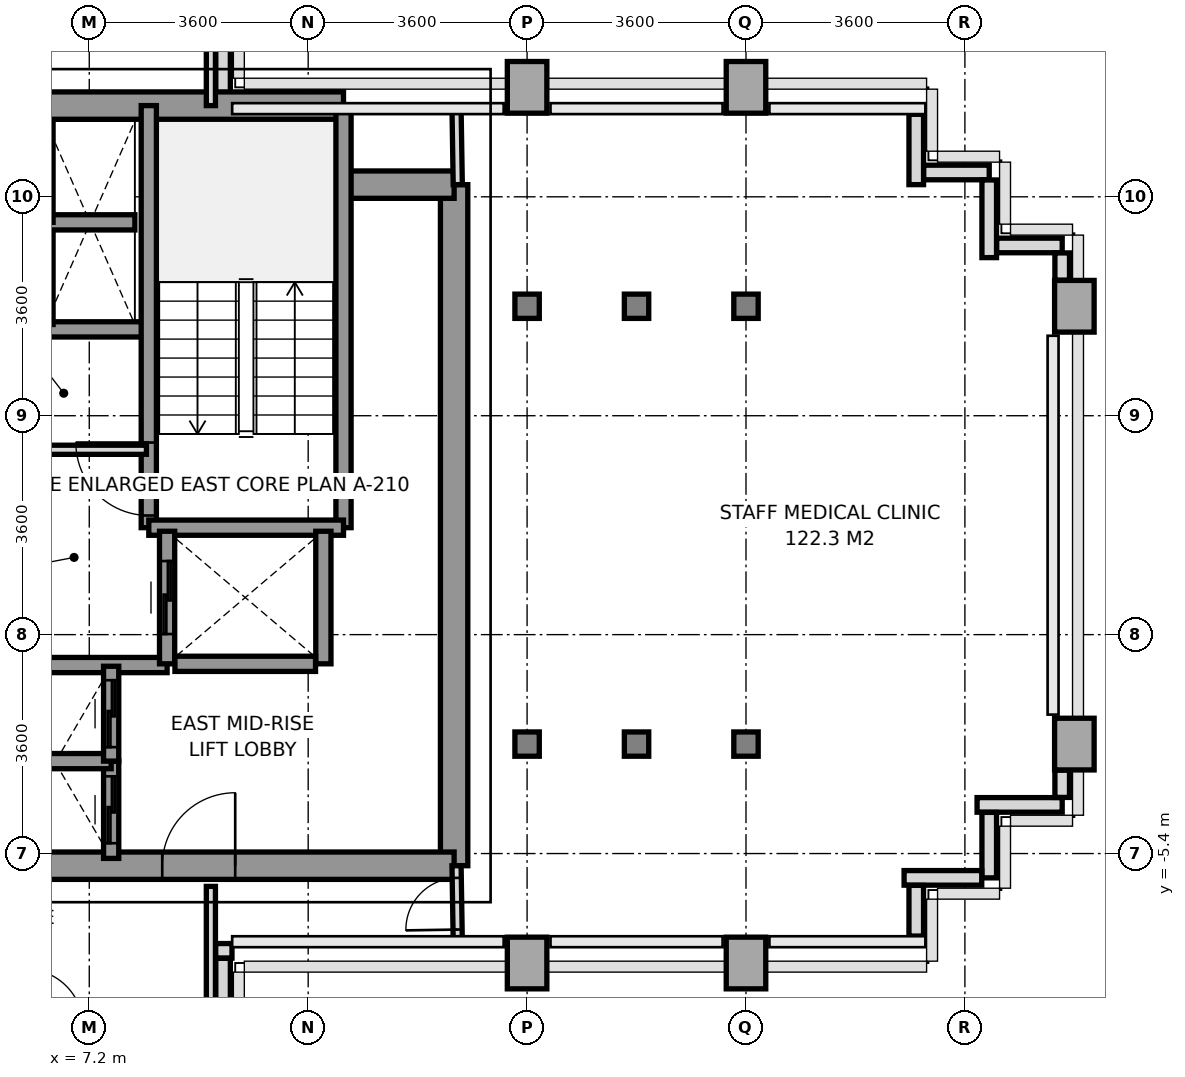
"""IFC4 building model, lengths in metres.
Left out: names, types, materials, properties, quantities, classifications, styles, units other than length and angle.
Written with IfcOpenShell. Run it as: python <this file> out.ifc"""

import sys

from ifc_helpers import new_model, si_unit, direction, frame, frame_2d, origin, origin_2d, place, context, subcontext, project, spatial, rectangle, i_section, extrude, source, transform, mapped, element, fill, save


model = new_model("IFC4")
c1 = context("Model", 3, precision=1e-05, world=origin(), true_north=direction((0.0, 1.0)))
c2 = subcontext(c1, "Body", "Model", "MODEL_VIEW")
j1 = project(units=[si_unit("LENGTHUNIT", "METRE"), si_unit("PLANEANGLEUNIT", "RADIAN")], contexts=[c1])
p1 = place(None, origin())
s1 = spatial("IfcSite", under=j1, at=p1, CompositionType="ELEMENT")
p2 = place(p1, origin())
s2 = spatial("IfcBuilding", under=s1, at=p2, CompositionType="ELEMENT")
p3 = place(p2, frame((0.0, 0.0, 144.8)))
s3 = spatial("IfcBuildingStorey", under=s2, at=p3, CompositionType="ELEMENT", Elevation=144.8)
m1 = source(origin(), c2, "Body", "SweptSolid", [
    extrude(rectangle(XDim=0.65, YDim=0.85, at=origin_2d()), origin(), (0.0, 0.0, 1.0), 3.2),
])
p4 = place(p3, frame((14.4, -7.2, 0.0), z_axis=(0.0, 0.0, 1.0), x_axis=(1.0, 0.0, 0.0)))
e1 = element("IfcColumn", 1, at=p4, inside=s3, PredefinedType="COLUMN", context=c2, shape_type="MappedRepresentation", body=[
    mapped(m1, transform((0.0, 0.0, 0.0), x_axis=(1.0, 0.0, 0.0), y_axis=(0.0, 1.0, 0.0), z_axis=(0.0, 0.0, 1.0), scale=1.0)),
])
m2 = source(origin(), c2, "Body", "SweptSolid", [
    extrude(i_section(OverallWidth=0.401, OverallDepth=0.399, WebThickness=0.02, FlangeThickness=0.032, at=origin_2d()), origin(), (0.0, 0.0, 1.0), 3.2),
])
for number, where, z_axis, x_axis in (
    (2, (14.4, -3.6, 0.0), (0.0, 0.0, 1.0), (1.0, 0.0, 0.0)),
    (3, (14.4, 3.6, 0.0), (0.0, 0.0, 1.0), (1.0, 0.0, 0.0)),
):
    element("IfcColumn", number, at=place(p3, frame(where, z_axis=z_axis, x_axis=x_axis)), inside=s3, PredefinedType="COLUMN", context=c2, shape_type="MappedRepresentation", body=[
        mapped(m2, transform((0.0, 0.0, 0.0), x_axis=(1.0, 0.0, 0.0), y_axis=(0.0, 1.0, 0.0), z_axis=(0.0, 0.0, 1.0), scale=1.0)),
    ])
p5 = place(p3, frame((14.4, 7.2, 0.0), z_axis=(0.0, 0.0, 1.0), x_axis=(1.0, 0.0, 0.0)))
e4 = element("IfcColumn", 4, at=p5, inside=s3, PredefinedType="COLUMN", context=c2, shape_type="MappedRepresentation", body=[
    mapped(m1, transform((0.0, 0.0, 0.0), x_axis=(1.0, 0.0, 0.0), y_axis=(0.0, 1.0, 0.0), z_axis=(0.0, 0.0, 1.0), scale=1.0)),
])
for number, where, z_axis, x_axis in (
    (5, (16.2, -3.6, 0.0), (0.0, 0.0, 1.0), (1.0, 0.0, 0.0)),
    (6, (16.2, 3.6, 0.0), (0.0, 0.0, 1.0), (1.0, 0.0, 0.0)),
):
    element("IfcColumn", number, at=place(p3, frame(where, z_axis=z_axis, x_axis=x_axis)), inside=s3, PredefinedType="COLUMN", context=c2, shape_type="MappedRepresentation", body=[
        mapped(m2, transform((0.0, 0.0, 0.0), x_axis=(1.0, 0.0, 0.0), y_axis=(0.0, 1.0, 0.0), z_axis=(0.0, 0.0, 1.0), scale=1.0)),
    ])
p6 = place(p3, frame((18.0, -7.2, 0.0), z_axis=(0.0, 0.0, 1.0), x_axis=(1.0, 0.0, 0.0)))
e7 = element("IfcColumn", 7, at=p6, inside=s3, PredefinedType="COLUMN", context=c2, shape_type="MappedRepresentation", body=[
    mapped(m1, transform((0.0, 0.0, 0.0), x_axis=(1.0, 0.0, 0.0), y_axis=(0.0, 1.0, 0.0), z_axis=(0.0, 0.0, 1.0), scale=1.0)),
])
for number, where, z_axis, x_axis in (
    (8, (18.0, -3.6, 0.0), (0.0, 0.0, 1.0), (1.0, 0.0, 0.0)),
    (9, (18.0, 3.6, 0.0), (0.0, 0.0, 1.0), (1.0, 0.0, 0.0)),
):
    element("IfcColumn", number, at=place(p3, frame(where, z_axis=z_axis, x_axis=x_axis)), inside=s3, PredefinedType="COLUMN", context=c2, shape_type="MappedRepresentation", body=[
        mapped(m2, transform((0.0, 0.0, 0.0), x_axis=(1.0, 0.0, 0.0), y_axis=(0.0, 1.0, 0.0), z_axis=(0.0, 0.0, 1.0), scale=1.0)),
    ])
for number, where, z_axis, x_axis in (
    (10, (18.0, 7.2, 0.0), (0.0, 0.0, 1.0), (1.0, 0.0, 0.0)),
    (11, (23.4, -3.6, 0.0), (0.0, 0.0, 1.0), (1.0, 0.0, 0.0)),
    (12, (23.4, 3.6, 0.0), (0.0, 0.0, 1.0), (1.0, 0.0, 0.0)),
):
    element("IfcColumn", number, at=place(p3, frame(where, z_axis=z_axis, x_axis=x_axis)), inside=s3, PredefinedType="COLUMN", context=c2, shape_type="MappedRepresentation", body=[
        mapped(m1, transform((0.0, 0.0, 0.0), x_axis=(1.0, 0.0, 0.0), y_axis=(0.0, 1.0, 0.0), z_axis=(0.0, 0.0, 1.0), scale=1.0)),
    ])
p7 = place(p3, frame((23.2, -4.6, 0.0), z_axis=(0.0, 0.0, 1.0), x_axis=(-1.0, 0.0, 0.0)))
e13 = element("IfcWall", 13, at=p7, inside=s3, PredefinedType="PARAPET", context=c2, shape_type="SweptSolid", body=[
    extrude(rectangle(XDim=1.4, YDim=0.24, at=frame_2d((0.7, 0.0))), origin(), (0.0, 0.0, 1.0), 1.15),
])
p8 = place(p3, frame((22.0, -4.723, 0.0), z_axis=(0.0, 0.0, 1.0), x_axis=(0.0, -1.0, 0.0)))
e14 = element("IfcWall", 14, at=p8, inside=s3, PredefinedType="PARAPET", context=c2, shape_type="SweptSolid", body=[
    extrude(rectangle(XDim=1.077, YDim=0.24, at=frame_2d((0.539, 0.0))), origin(), (0.0, 0.0, 1.0), 1.15),
])
p9 = place(p3, frame((21.877, -5.8, 0.0), z_axis=(0.0, 0.0, 1.0), x_axis=(-1.0, 0.0, 0.0)))
e15 = element("IfcWall", 15, at=p9, inside=s3, PredefinedType="PARAPET", context=c2, shape_type="SweptSolid", body=[
    extrude(rectangle(XDim=1.277, YDim=0.24, at=frame_2d((0.638, 0.0))), origin(), (0.0, 0.0, 1.0), 1.15),
])
p10 = place(p3, frame((20.8, -5.923, 0.0), z_axis=(0.0, 0.0, 1.0), x_axis=(0.0, -1.0, 0.0)))
e16 = element("IfcWall", 16, at=p10, inside=s3, PredefinedType="PARAPET", context=c2, shape_type="SweptSolid", body=[
    extrude(rectangle(XDim=0.834, YDim=0.24, at=frame_2d((0.417, 0.0))), origin(), (0.0, 0.0, 1.0), 1.15),
])
p11 = place(p3, frame((9.547, -7.0, 0.0), z_axis=(0.0, 0.0, 1.0), x_axis=(-1.0, 0.0, 0.0)))
e17 = element("IfcWall", 17, at=p11, inside=s3, PredefinedType="PARAPET", context=c2, shape_type="SweptSolid", body=[
    extrude(rectangle(XDim=0.269, YDim=0.24, at=frame_2d((0.135, 0.0))), origin(), (0.0, 0.0, 1.0), 1.15),
])
p12 = place(p3, frame((9.4, -7.123, 0.0), z_axis=(0.0, 0.0, 1.0), x_axis=(0.0, -1.0, 0.0)))
e18 = element("IfcWall", 18, at=p12, inside=s3, PredefinedType="PARAPET", context=c2, shape_type="SweptSolid", body=[
    extrude(rectangle(XDim=1.349, YDim=0.24, at=frame_2d((0.674, 0.0))), origin(), (0.0, 0.0, 1.0), 1.15),
])
p13 = place(p3, frame((9.4, 8.472, 0.0), z_axis=(0.0, 0.0, 1.0), x_axis=(0.0, -1.0, 0.0)))
e19 = element("IfcWall", 19, at=p13, inside=s3, PredefinedType="PARAPET", context=c2, shape_type="SweptSolid", body=[
    extrude(rectangle(XDim=1.519, YDim=0.24, at=frame_2d((0.76, 0.0))), origin(), (0.0, 0.0, 1.0), 1.15),
])
p14 = place(p3, frame((20.8, 6.757, 0.0), z_axis=(0.0, 0.0, 1.0), x_axis=(0.0, -1.0, 0.0)))
e20 = element("IfcWall", 20, at=p14, inside=s3, PredefinedType="PARAPET", context=c2, shape_type="SweptSolid", body=[
    extrude(rectangle(XDim=1.157, YDim=0.24, at=frame_2d((0.579, 0.0))), origin(), (0.0, 0.0, 1.0), 1.15),
])
p15 = place(p3, frame((20.923, 5.8, 0.0), z_axis=(0.0, 0.0, 1.0), x_axis=(1.0, 0.0, 0.0)))
e21 = element("IfcWall", 21, at=p15, inside=s3, PredefinedType="PARAPET", context=c2, shape_type="SweptSolid", body=[
    extrude(rectangle(XDim=1.077, YDim=0.24, at=frame_2d((0.539, 0.0))), origin(), (0.0, 0.0, 1.0), 1.15),
])
p16 = place(p3, frame((22.0, 5.677, 0.0), z_axis=(0.0, 0.0, 1.0), x_axis=(0.0, -1.0, 0.0)))
e22 = element("IfcWall", 22, at=p16, inside=s3, PredefinedType="PARAPET", context=c2, shape_type="SweptSolid", body=[
    extrude(rectangle(XDim=1.277, YDim=0.24, at=frame_2d((0.639, 0.0))), origin(), (0.0, 0.0, 1.0), 1.15),
])
p17 = place(p3, frame((22.123, 4.6, 0.0), z_axis=(0.0, 0.0, 1.0), x_axis=(1.0, 0.0, 0.0)))
e23 = element("IfcWall", 23, at=p17, inside=s3, PredefinedType="PARAPET", context=c2, shape_type="SweptSolid", body=[
    extrude(rectangle(XDim=1.077, YDim=0.24, at=frame_2d((0.539, 0.0))), origin(), (0.0, 0.0, 1.0), 1.15),
])
for number, where, z_axis, x_axis in (
    (24, (23.2, 4.477, 0.0), (0.0, 0.0, 1.0), (0.0, -1.0, 0.0)),
    (25, (23.2, -4.028, 0.0), (0.0, 0.0, 1.0), (0.0, -1.0, 0.0)),
):
    element("IfcWall", number, at=place(p3, frame(where, z_axis=z_axis, x_axis=x_axis)), inside=s3, PredefinedType="PARAPET", context=c2, shape_type="SweptSolid", body=[
        extrude(rectangle(XDim=0.449, YDim=0.24, at=frame_2d((0.225, 0.0))), origin(), (0.0, 0.0, 1.0), 1.15),
    ])
p18 = place(p3, frame((13.2, -5.6, 0.0), z_axis=(0.0, 0.0, 1.0), x_axis=(0.0, 1.0, 0.0)))
e26 = element("IfcWall", 26, at=p18, inside=s3, PredefinedType="SHEAR", context=c2, shape_type="SweptSolid", body=[
    extrude(rectangle(XDim=11.2, YDim=0.45, at=frame_2d((5.6, 0.0))), origin(), (0.0, 0.0, 1.0), 3.2),
])
p19 = place(p3, frame((5.4, 6.9, 0.0), z_axis=(0.0, 0.0, 1.0), x_axis=(1.0, 0.0, 0.0)))
e27 = element("IfcWall", 27, at=p19, inside=s3, PredefinedType="SHEAR", context=c2, shape_type="SweptSolid", body=[
    extrude(rectangle(XDim=5.981, YDim=0.45, at=frame_2d((2.991, 0.0))), origin(), (0.0, 0.0, 1.0), 3.2),
])
p20 = place(p3, frame((11.381, 5.6, 0.0), z_axis=(0.0, 0.0, 1.0), x_axis=(1.0, 0.0, 0.0)))
e28 = element("IfcWall", 28, at=p20, inside=s3, PredefinedType="SHEAR", context=c2, shape_type="SweptSolid", body=[
    extrude(rectangle(XDim=1.819, YDim=0.45, at=frame_2d((0.909, 0.0))), origin(), (0.0, 0.0, 1.0), 3.2),
])
p21 = place(p3, frame((5.4, -5.6, 0.0), z_axis=(0.0, 0.0, 1.0), x_axis=(1.0, 0.0, 0.0)))
e29 = element("IfcWall", 29, at=p21, inside=s3, PredefinedType="SHEAR", context=c2, shape_type="SweptSolid", body=[
    extrude(rectangle(XDim=7.8, YDim=0.45, at=frame_2d((3.9, 0.0))), origin(), (0.0, 0.0, 1.0), 3.2),
])
p22 = place(p21, frame((3.0, 0.0, 0.0)))
e30 = element("IfcOpeningElement", 30, at=p22, cuts=e29, PredefinedType="OPENING", context=c2, shape_type="SweptSolid", body=[
    extrude(rectangle(XDim=1.2, YDim=2.2, at=frame_2d((0.6, 1.1))), frame((0.0, 0.235, 0.0), z_axis=(0.0, -1.0, 0.0), x_axis=(1.0, 0.0, 0.0)), (0.0, 0.0, 1.0), 0.47),
])
p23 = place(p3, frame((5.4, 3.22, 0.0), z_axis=(0.0, 0.0, 1.0), x_axis=(1.0, 0.0, 0.0)))
e31 = element("IfcWall", 31, at=p23, inside=s3, PredefinedType="SOLIDWALL", context=c2, shape_type="SweptSolid", body=[
    extrude(rectangle(XDim=2.78, YDim=0.25, at=frame_2d((1.39, 0.0))), origin(), (0.0, 0.0, 1.0), 3.2),
])
p24 = place(p3, frame((5.4, -2.3, 0.0), z_axis=(0.0, 0.0, 1.0), x_axis=(1.0, 0.0, 0.0)))
e32 = element("IfcWall", 32, at=p24, inside=s3, PredefinedType="SOLIDWALL", context=c2, shape_type="SweptSolid", body=[
    extrude(rectangle(XDim=3.08, YDim=0.25, at=frame_2d((1.54, 0.0))), origin(), (0.0, 0.0, 1.0), 3.2),
])
p25 = place(p3, frame((8.179, -0.041, 0.0), z_axis=(0.0, 0.0, 1.0), x_axis=(0.0, 1.0, 0.0)))
e33 = element("IfcWall", 33, at=p25, inside=s3, PredefinedType="SOLIDWALL", context=c2, shape_type="SweptSolid", body=[
    extrude(rectangle(XDim=6.941, YDim=0.25, at=frame_2d((3.47, 0.0))), origin(), (0.0, 0.0, 1.0), 3.2),
])
p26 = place(p25, frame((0.2, 0.0, 0.0)))
e34 = element("IfcOpeningElement", 34, at=p26, cuts=e33, PredefinedType="OPENING", context=c2, shape_type="SweptSolid", body=[
    extrude(rectangle(XDim=1.2, YDim=2.2, at=frame_2d((0.6, 1.1))), frame((0.0, 0.135, 0.0), z_axis=(0.0, -1.0, 0.0), x_axis=(1.0, 0.0, 0.0)), (0.0, 0.0, 1.0), 0.27),
])
p27 = place(p3, frame((11.381, -0.041, 0.0), z_axis=(0.0, 0.0, 1.0), x_axis=(0.0, 1.0, 0.0)))
e35 = element("IfcWall", 35, at=p27, inside=s3, PredefinedType="SOLIDWALL", context=c2, shape_type="SweptSolid", body=[
    extrude(rectangle(XDim=6.941, YDim=0.25, at=frame_2d((3.47, 0.0))), origin(), (0.0, 0.0, 1.0), 3.2),
])
p28 = place(p3, frame((8.179, -0.041, 0.0), z_axis=(0.0, 0.0, 1.0), x_axis=(1.0, 0.0, 0.0)))
e36 = element("IfcWall", 36, at=p28, inside=s3, PredefinedType="SOLIDWALL", context=c2, shape_type="SweptSolid", body=[
    extrude(rectangle(XDim=3.202, YDim=0.25, at=frame_2d((1.601, 0.0))), origin(), (0.0, 0.0, 1.0), 3.2),
])
p29 = place(p3, frame((8.48, -2.28, 0.0), z_axis=(0.0, 0.0, 1.0), x_axis=(0.0, 1.0, 0.0)))
e37 = element("IfcWall", 37, at=p29, inside=s3, PredefinedType="SOLIDWALL", context=c2, shape_type="SweptSolid", body=[
    extrude(rectangle(XDim=2.18, YDim=0.25, at=frame_2d((1.09, 0.0))), origin(), (0.0, 0.0, 1.0), 3.2),
])
p30 = place(p29, frame((0.49, 0.0, 0.0)))
e38 = element("IfcOpeningElement", 38, at=p30, cuts=e37, PredefinedType="OPENING", context=c2, shape_type="SweptSolid", body=[
    extrude(rectangle(XDim=1.2, YDim=2.2, at=frame_2d((0.6, 1.1))), frame((0.0, 0.135, 0.0), z_axis=(0.0, -1.0, 0.0), x_axis=(1.0, 0.0, 0.0)), (0.0, 0.0, 1.0), 0.27),
])
p31 = place(p3, frame((11.05, -2.28, 0.0), z_axis=(0.0, 0.0, 1.0), x_axis=(0.0, 1.0, 0.0)))
e39 = element("IfcWall", 39, at=p31, inside=s3, PredefinedType="SOLIDWALL", context=c2, shape_type="SweptSolid", body=[
    extrude(rectangle(XDim=2.18, YDim=0.25, at=frame_2d((1.09, 0.0))), origin(), (0.0, 0.0, 1.0), 3.2),
])
p32 = place(p3, frame((8.609, -2.28, 0.0), z_axis=(0.0, 0.0, 1.0), x_axis=(1.0, 0.0, 0.0)))
e40 = element("IfcWall", 40, at=p32, inside=s3, PredefinedType="SOLIDWALL", context=c2, shape_type="SweptSolid", body=[
    extrude(rectangle(XDim=2.312, YDim=0.25, at=frame_2d((1.156, 0.0))), origin(), (0.0, 0.0, 1.0), 3.2),
])
p33 = place(p3, frame((7.56, -5.48, 0.0), z_axis=(0.0, 0.0, 1.0), x_axis=(0.0, 1.0, 0.0)))
e41 = element("IfcWall", 41, at=p33, inside=s3, PredefinedType="SOLIDWALL", context=c2, shape_type="SweptSolid", body=[
    extrude(rectangle(XDim=1.6, YDim=0.25, at=frame_2d((0.8, 0.0))), origin(), (0.0, 0.0, 1.0), 3.2),
])
p34 = place(p33, frame((0.25, 0.0, 0.0)))
e42 = element("IfcOpeningElement", 42, at=p34, cuts=e41, PredefinedType="OPENING", context=c2, shape_type="SweptSolid", body=[
    extrude(rectangle(XDim=1.1, YDim=2.2, at=frame_2d((0.55, 1.1))), frame((0.0, 0.135, 0.0), z_axis=(0.0, -1.0, 0.0), x_axis=(1.0, 0.0, 0.0)), (0.0, 0.0, 1.0), 0.27),
])
p35 = place(p3, frame((5.72, -3.88, 0.0), z_axis=(0.0, 0.0, 1.0), x_axis=(1.0, 0.0, 0.0)))
e43 = element("IfcWall", 43, at=p35, inside=s3, PredefinedType="SOLIDWALL", context=c2, shape_type="SweptSolid", body=[
    extrude(rectangle(XDim=1.84, YDim=0.25, at=frame_2d((0.92, 0.0))), origin(), (0.0, 0.0, 1.0), 3.2),
])
p36 = place(p3, frame((7.56, -3.88, 0.0), z_axis=(0.0, 0.0, 1.0), x_axis=(0.0, 1.0, 0.0)))
e44 = element("IfcWall", 44, at=p36, inside=s3, PredefinedType="SOLIDWALL", context=c2, shape_type="SweptSolid", body=[
    extrude(rectangle(XDim=1.56, YDim=0.25, at=frame_2d((0.78, 0.0))), origin(), (0.0, 0.0, 1.0), 3.2),
])
p37 = place(p36, frame((0.23, 0.0, 0.0)))
e45 = element("IfcOpeningElement", 45, at=p37, cuts=e44, PredefinedType="OPENING", context=c2, shape_type="SweptSolid", body=[
    extrude(rectangle(XDim=1.1, YDim=2.2, at=frame_2d((0.55, 1.1))), frame((0.0, 0.135, 0.0), z_axis=(0.0, -1.0, 0.0), x_axis=(1.0, 0.0, 0.0)), (0.0, 0.0, 1.0), 0.27),
])
p38 = place(p3, frame((6.48, 3.3, 0.0), z_axis=(0.0, 0.0, 1.0), x_axis=(0.0, 1.0, 0.0)))
e46 = element("IfcWall", 46, at=p38, inside=s3, PredefinedType="SOLIDWALL", context=c2, shape_type="SweptSolid", body=[
    extrude(rectangle(XDim=1.68, YDim=0.25, at=frame_2d((0.84, 0.0))), origin(), (0.0, 0.0, 1.0), 3.2),
])
p39 = place(p3, frame((6.48, 4.98, 0.0), z_axis=(0.0, 0.0, 1.0), x_axis=(1.0, 0.0, 0.0)))
e47 = element("IfcWall", 47, at=p39, inside=s3, PredefinedType="SOLIDWALL", context=c2, shape_type="SweptSolid", body=[
    extrude(rectangle(XDim=1.47, YDim=0.25, at=frame_2d((0.735, 0.0))), origin(), (0.0, 0.0, 1.0), 3.2),
])
p40 = place(p3, frame((6.48, 4.98, 0.0), z_axis=(0.0, 0.0, 1.0), x_axis=(0.0, 1.0, 0.0)))
e48 = element("IfcWall", 48, at=p40, inside=s3, PredefinedType="SOLIDWALL", context=c2, shape_type="SweptSolid", body=[
    extrude(rectangle(XDim=1.67, YDim=0.25, at=frame_2d((0.835, 0.0))), origin(), (0.0, 0.0, 1.0), 3.2),
])
p41 = place(p3, frame((5.75, 1.24, 0.0), z_axis=(0.0, 0.0, 1.0), x_axis=(1.0, 0.0, 0.0)))
e49 = element("IfcWall", 49, at=p41, inside=s3, PredefinedType="PARTITIONING", context=c2, shape_type="SweptSolid", body=[
    extrude(rectangle(XDim=2.39, YDim=0.15, at=frame_2d((1.195, 0.0))), origin(), (0.0, 0.0, 1.0), 2.3),
])
p42 = place(p3, frame((9.2, 6.9, 0.0), z_axis=(0.0, 0.0, 1.0), x_axis=(0.0, 1.0, 0.0)))
e50 = element("IfcWall", 50, at=p42, inside=s3, PredefinedType="PARTITIONING", context=c2, shape_type="SweptSolid", body=[
    extrude(rectangle(XDim=8.78, YDim=0.15, at=frame_2d((4.39, 0.0))), origin(), (0.0, 0.0, 1.0), 2.7),
])
p43 = place(p3, frame((9.2, -15.68, 0.0), z_axis=(0.0, 0.0, 1.0), x_axis=(0.0, 1.0, 0.0)))
e51 = element("IfcWall", 51, at=p43, inside=s3, PredefinedType="PARTITIONING", context=c2, shape_type="SweptSolid", body=[
    extrude(rectangle(XDim=9.74, YDim=0.15, at=frame_2d((4.87, 0.0))), origin(), (0.0, 0.0, 1.0), 2.7),
])
p44 = place(p3, frame((13.26, 5.6, 0.0), z_axis=(0.0, 0.0, 1.0), x_axis=(-0.016013571389, 0.999871774545, 0.0)))
e52 = element("IfcWall", 52, at=p44, inside=s3, PredefinedType="PARTITIONING", context=c2, shape_type="SweptSolid", body=[
    extrude(rectangle(XDim=1.25, YDim=0.15, at=frame_2d((0.625, 0.0))), origin(), (0.0, 0.0, 1.0), 3.2),
])
p45 = place(p3, frame((13.26, -6.85, 0.0), z_axis=(0.0, 0.0, 1.0), x_axis=(-0.016013571389, 0.999871774545, 0.0)))
e53 = element("IfcWall", 53, at=p45, inside=s3, PredefinedType="PARTITIONING", context=c2, shape_type="SweptSolid", body=[
    extrude(rectangle(XDim=1.25, YDim=0.15, at=frame_2d((0.625, 0.0))), origin(), (0.0, 0.0, 1.0), 3.2),
])
p46 = place(p45, frame((0.2, 0.0, 0.0)))
e54 = element("IfcOpeningElement", 54, at=p46, cuts=e53, PredefinedType="OPENING", context=c2, shape_type="SweptSolid", body=[
    extrude(rectangle(XDim=0.85, YDim=2.1, at=frame_2d((0.425, 1.05))), frame((0.0, 0.085, 0.0), z_axis=(0.0, -1.0, 0.0), x_axis=(1.0, 0.0, 0.0)), (0.0, 0.0, 1.0), 0.17),
])
m3 = source(origin(), c2, "Body", "SweptSolid", [
    extrude(rectangle(XDim=1.2, YDim=2.2, at=frame_2d((0.6, 1.1))), frame((0.0, 0.025, 0.0), z_axis=(0.0, -1.0, 0.0), x_axis=(1.0, 0.0, 0.0)), (0.0, 0.0, 1.0), 0.05),
])
p47 = place(p26, origin())
e55 = element("IfcDoor", 55, at=p47, inside=s3, OperationType="SINGLE_SWING_RIGHT", PredefinedType="DOOR", context=c2, shape_type="MappedRepresentation", body=[
    mapped(m3, transform((0.0, 0.0, 0.0), x_axis=(1.0, 0.0, 0.0), y_axis=(0.0, 1.0, 0.0), z_axis=(0.0, 0.0, 1.0), scale=1.0)),
])
fill(e34, e55)
p48 = place(p22, origin())
e56 = element("IfcDoor", 56, at=p48, inside=s3, OperationType="SINGLE_SWING_RIGHT", PredefinedType="DOOR", context=c2, shape_type="MappedRepresentation", body=[
    mapped(m3, transform((0.0, 0.0, 0.0), x_axis=(1.0, 0.0, 0.0), y_axis=(0.0, 1.0, 0.0), z_axis=(0.0, 0.0, 1.0), scale=1.0)),
])
fill(e30, e56)
p49 = place(p30, origin())
e57 = element("IfcDoor", 57, at=p49, inside=s3, OperationType="SLIDING_TO_RIGHT", PredefinedType="DOOR", context=c2, shape_type="MappedRepresentation", body=[
    mapped(m3, transform((0.0, 0.0, 0.0), x_axis=(1.0, 0.0, 0.0), y_axis=(0.0, 1.0, 0.0), z_axis=(0.0, 0.0, 1.0), scale=1.0)),
])
fill(e38, e57)
m4 = source(origin(), c2, "Body", "SweptSolid", [
    extrude(rectangle(XDim=1.1, YDim=2.2, at=frame_2d((0.55, 1.1))), frame((0.0, 0.025, 0.0), z_axis=(0.0, -1.0, 0.0), x_axis=(1.0, 0.0, 0.0)), (0.0, 0.0, 1.0), 0.05),
])
p50 = place(p34, origin())
e58 = element("IfcDoor", 58, at=p50, inside=s3, OperationType="SLIDING_TO_LEFT", PredefinedType="DOOR", context=c2, shape_type="MappedRepresentation", body=[
    mapped(m4, transform((0.0, 0.0, 0.0), x_axis=(1.0, 0.0, 0.0), y_axis=(0.0, 1.0, 0.0), z_axis=(0.0, 0.0, 1.0), scale=1.0)),
])
fill(e42, e58)
p51 = place(p37, origin())
e59 = element("IfcDoor", 59, at=p51, inside=s3, OperationType="SLIDING_TO_LEFT", PredefinedType="DOOR", context=c2, shape_type="MappedRepresentation", body=[
    mapped(m4, transform((0.0, 0.0, 0.0), x_axis=(1.0, 0.0, 0.0), y_axis=(0.0, 1.0, 0.0), z_axis=(0.0, 0.0, 1.0), scale=1.0)),
])
fill(e45, e59)
m5 = source(origin(), c2, "Body", "SweptSolid", [
    extrude(rectangle(XDim=0.85, YDim=2.1, at=frame_2d((0.425, 1.05))), frame((0.0, 0.025, 0.0), z_axis=(0.0, -1.0, 0.0), x_axis=(1.0, 0.0, 0.0)), (0.0, 0.0, 1.0), 0.05),
])
p52 = place(p46, origin())
e60 = element("IfcDoor", 60, at=p52, inside=s3, OperationType="SINGLE_SWING_LEFT", PredefinedType="DOOR", context=c2, shape_type="MappedRepresentation", body=[
    mapped(m5, transform((0.0, 0.0, 0.0), x_axis=(1.0, 0.0, 0.0), y_axis=(0.0, 1.0, 0.0), z_axis=(0.0, 0.0, 1.0), scale=1.0)),
])
fill(e54, e60)
save(model, sys.argv[1])
